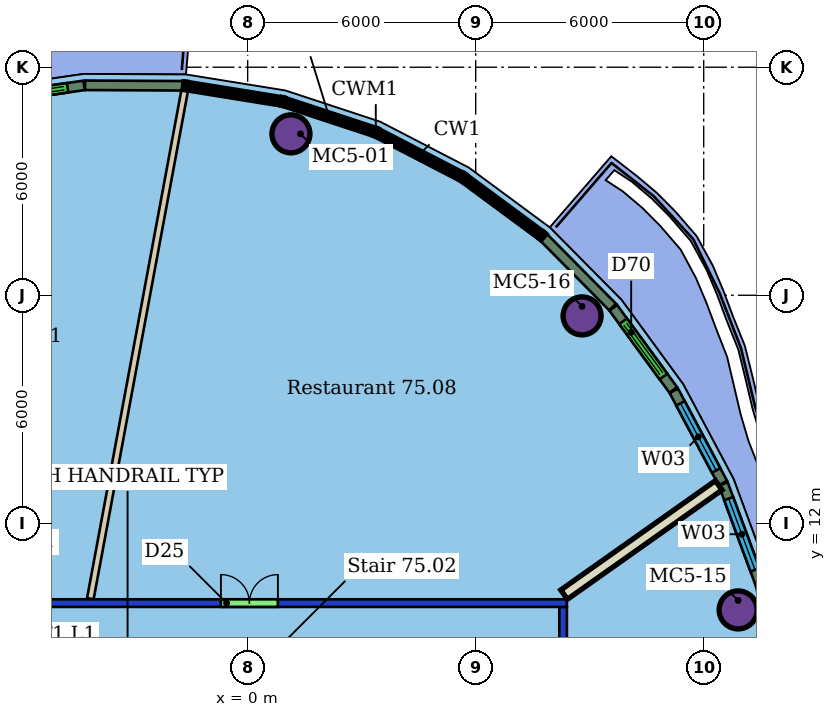
"""IFC4 building model, lengths in metres.
Left out: names, types, materials, properties, quantities, classifications, styles, units other than length and angle.
Written with IfcOpenShell. Run it as: python <this file> out.ifc"""

import sys

from ifc_helpers import new_model, si_unit, direction, frame, frame_2d, origin, origin_2d, place, context, subcontext, project, spatial, rectangle, hollow_circle, extrude, element, fill, save


model = new_model("IFC4")
c1 = context("Model", 3, precision=1e-05, world=origin(), true_north=direction((0.0, 1.0)))
c2 = subcontext(c1, "Body", "Model", "MODEL_VIEW")
j1 = project(units=[si_unit("LENGTHUNIT", "METRE"), si_unit("PLANEANGLEUNIT", "RADIAN")], contexts=[c1])
p1 = place(None, origin())
s1 = spatial("IfcSite", under=j1, at=p1, CompositionType="ELEMENT")
p2 = place(p1, origin())
s2 = spatial("IfcBuilding", under=s1, at=p2, CompositionType="ELEMENT")
p3 = place(p2, frame((0.0, 0.0, 300.9)))
s3 = spatial("IfcBuildingStorey", under=s2, at=p3, CompositionType="ELEMENT", Elevation=300.9)
for number, where, z_axis, x_axis in (
    (1, (1.138, 22.247, 0.0), (0.0, 0.0, 1.0), (1.0, 0.0, 0.0)),
    (2, (12.906, 9.72, 0.0), (0.0, 0.0, 1.0), (1.0, 0.0, 0.0)),
    (3, (8.8, 17.457, 0.0), (0.0, 0.0, 1.0), (1.0, 0.0, 0.0)),
):
    element("IfcColumn", number, at=place(p3, frame(where, z_axis=z_axis, x_axis=x_axis)), inside=s3, PredefinedType="COLUMN", context=c2, shape_type="SweptSolid", body=[
        extrude(hollow_circle(Radius=0.5, WallThickness=0.04, at=origin_2d()), origin(), (0.0, 0.0, 1.0), 3.4),
    ])
p4 = place(p3, frame((-20.4, 9.9, 0.0), z_axis=(0.0, 0.0, 1.0), x_axis=(1.0, 0.0, 0.0)))
e4 = element("IfcWall", 4, at=p4, inside=s3, PredefinedType="PARTITIONING", context=c2, shape_type="SweptSolid", body=[
    extrude(rectangle(XDim=28.8, YDim=0.2, at=frame_2d((14.4, 0.0))), origin(), (0.0, 0.0, 1.0), 3.05),
])
p5 = place(p4, frame((11.495, 0.0, 0.0)))
e5 = element("IfcOpeningElement", 5, at=p5, cuts=e4, PredefinedType="OPENING", context=c2, shape_type="SweptSolid", body=[
    extrude(rectangle(XDim=1.8, YDim=2.1, at=frame_2d((0.9, 1.05))), frame((0.0, 0.11, 0.0), z_axis=(0.0, -1.0, 0.0), x_axis=(1.0, 0.0, 0.0)), (0.0, 0.0, 1.0), 0.22),
])
p6 = place(p4, frame((5.758, 0.0, 0.0)))
e6 = element("IfcOpeningElement", 6, at=p6, cuts=e4, PredefinedType="OPENING", context=c2, shape_type="SweptSolid", body=[
    extrude(rectangle(XDim=1.5, YDim=2.1, at=frame_2d((0.75, 1.05))), frame((0.0, 0.11, 0.0), z_axis=(0.0, -1.0, 0.0), x_axis=(1.0, 0.0, 0.0)), (0.0, 0.0, 1.0), 0.22),
])
p7 = place(p4, frame((19.695, 0.0, 0.0)))
e7 = element("IfcOpeningElement", 7, at=p7, cuts=e4, PredefinedType="OPENING", context=c2, shape_type="SweptSolid", body=[
    extrude(rectangle(XDim=1.5, YDim=2.4, at=frame_2d((0.75, 1.2))), frame((0.0, 0.11, 0.0), z_axis=(0.0, -1.0, 0.0), x_axis=(1.0, 0.0, 0.0)), (0.0, 0.0, 1.0), 0.22),
])
p8 = place(p3, frame((8.3, 9.8, 0.0), z_axis=(0.0, 0.0, 1.0), x_axis=(0.0, -1.0, 0.0)))
e8 = element("IfcWall", 8, at=p8, inside=s3, PredefinedType="PARTITIONING", context=c2, shape_type="SweptSolid", body=[
    extrude(rectangle(XDim=19.6, YDim=0.2, at=frame_2d((9.8, 0.0))), origin(), (0.0, 0.0, 1.0), 3.05),
])
p9 = place(p8, frame((11.636, 0.0, 0.0)))
e9 = element("IfcOpeningElement", 9, at=p9, cuts=e8, PredefinedType="OPENING", context=c2, shape_type="SweptSolid", body=[
    extrude(rectangle(XDim=1.8, YDim=2.4, at=frame_2d((0.9, 1.2))), frame((0.0, 0.11, 0.0), z_axis=(0.0, -1.0, 0.0), x_axis=(1.0, 0.0, 0.0)), (0.0, 0.0, 1.0), 0.22),
])
p10 = place(p3, frame((-1.658, 23.387, 0.0), z_axis=(0.0, 0.0, 1.0), x_axis=(-0.1825398841, -0.983198449303, 0.0)))
e10 = element("IfcWall", 10, at=p10, inside=s3, PredefinedType="PARTITIONING", context=c2, shape_type="SweptSolid", body=[
    extrude(rectangle(XDim=13.599, YDim=0.175, at=frame_2d((6.8, 0.0))), origin(), (0.0, 0.0, 1.0), 3.4),
])
p11 = place(p3, frame((12.396, 12.998, 0.0), z_axis=(0.0, 0.0, 1.0), x_axis=(-0.816698923904, -0.577064006583, 0.0)))
e11 = element("IfcWall", 11, at=p11, inside=s3, PredefinedType="PARTITIONING", context=c2, shape_type="SweptSolid", body=[
    extrude(rectangle(XDim=4.983, YDim=0.3, at=frame_2d((2.491, 0.0))), origin(), (0.0, 0.0, 1.0), 3.4),
])
p12 = place(p3, frame((-1.703, 23.511, 0.0), z_axis=(0.0, 0.0, 1.0), x_axis=(-0.999986408608, 0.005213693476, 0.0)))
e12 = element("IfcWall", 12, at=p12, inside=s3, PredefinedType="SOLIDWALL", context=c2, shape_type="SweptSolid", body=[
    extrude(rectangle(XDim=2.575, YDim=0.25, at=frame_2d((1.288, 0.0))), origin(), (0.0, 0.0, 1.0), 3.1),
])
p13 = place(p3, frame((-4.305, 23.523, 0.0), z_axis=(0.0, 0.0, 1.0), x_axis=(-0.989681415389, -0.143285365734, 0.0)))
e13 = element("IfcWall", 13, at=p13, inside=s3, PredefinedType="SOLIDWALL", context=c2, shape_type="SweptSolid", body=[
    extrude(rectangle(XDim=2.677, YDim=0.25, at=frame_2d((1.338, 0.0))), origin(), (0.0, 0.0, 1.0), 3.1),
])
p14 = place(p13, frame((0.438, 0.0, 0.0)))
e14 = element("IfcOpeningElement", 14, at=p14, cuts=e13, PredefinedType="OPENING", context=c2, shape_type="SweptSolid", body=[
    extrude(rectangle(XDim=1.8, YDim=2.4, at=frame_2d((0.9, 1.2))), frame((0.0, 0.135, 0.0), z_axis=(0.0, -1.0, 0.0), x_axis=(1.0, 0.0, 0.0)), (0.0, 0.0, 1.0), 0.27),
])
p15 = place(p3, frame((14.147, 7.533, 0.0), z_axis=(0.0, 0.0, 1.0), x_axis=(-0.223256314802, 0.974759774458, 0.0)))
e15 = element("IfcWall", 15, at=p15, inside=s3, PredefinedType="SOLIDWALL", context=c2, shape_type="SweptSolid", body=[
    extrude(rectangle(XDim=2.903, YDim=0.25, at=frame_2d((1.452, 0.0))), origin(), (0.0, 0.0, 1.0), 3.1),
])
p16 = place(p15, frame((0.302, 0.0, 0.9)))
e16 = element("IfcOpeningElement", 16, at=p16, cuts=e15, PredefinedType="OPENING", context=c2, shape_type="SweptSolid", body=[
    extrude(rectangle(XDim=2.0, YDim=2.1, at=frame_2d((1.0, 1.05))), frame((0.0, 0.135, 0.0), z_axis=(0.0, -1.0, 0.0), x_axis=(1.0, 0.0, 0.0)), (0.0, 0.0, 1.0), 0.27),
])
p17 = place(p3, frame((13.492, 10.387, 0.0), z_axis=(0.0, 0.0, 1.0), x_axis=(-0.3462418827, 0.938145275885, 0.0)))
e17 = element("IfcWall", 17, at=p17, inside=s3, PredefinedType="SOLIDWALL", context=c2, shape_type="SweptSolid", body=[
    extrude(rectangle(XDim=2.825, YDim=0.25, at=frame_2d((1.413, 0.0))), origin(), (0.0, 0.0, 1.0), 3.1),
])
p18 = place(p17, frame((0.413, 0.0, 0.9)))
e18 = element("IfcOpeningElement", 18, at=p18, cuts=e17, PredefinedType="OPENING", context=c2, shape_type="SweptSolid", body=[
    extrude(rectangle(XDim=2.0, YDim=2.1, at=frame_2d((1.0, 1.05))), frame((0.0, 0.135, 0.0), z_axis=(0.0, -1.0, 0.0), x_axis=(1.0, 0.0, 0.0)), (0.0, 0.0, 1.0), 0.27),
])
p19 = place(p3, frame((12.504, 13.06, 0.0), z_axis=(0.0, 0.0, 1.0), x_axis=(-0.469564356189, 0.882898247476, 0.0)))
e19 = element("IfcWall", 19, at=p19, inside=s3, PredefinedType="SOLIDWALL", context=c2, shape_type="SweptSolid", body=[
    extrude(rectangle(XDim=2.748, YDim=0.25, at=frame_2d((1.374, 0.0))), origin(), (0.0, 0.0, 1.0), 3.1),
])
p20 = place(p19, frame((0.374, 0.0, 0.9)))
e20 = element("IfcOpeningElement", 20, at=p20, cuts=e19, PredefinedType="OPENING", context=c2, shape_type="SweptSolid", body=[
    extrude(rectangle(XDim=2.0, YDim=2.1, at=frame_2d((1.0, 1.05))), frame((0.0, 0.135, 0.0), z_axis=(0.0, -1.0, 0.0), x_axis=(1.0, 0.0, 0.0)), (0.0, 0.0, 1.0), 0.27),
])
p21 = place(p3, frame((11.2, 15.508, 0.0), z_axis=(0.0, 0.0, 1.0), x_axis=(-0.59003031017, 0.80738109532, 0.0)))
e21 = element("IfcWall", 21, at=p21, inside=s3, PredefinedType="SOLIDWALL", context=c2, shape_type="SweptSolid", body=[
    extrude(rectangle(XDim=2.677, YDim=0.25, at=frame_2d((1.338, 0.0))), origin(), (0.0, 0.0, 1.0), 3.1),
])
p22 = place(p21, frame((0.438, 0.0, 0.0)))
e22 = element("IfcOpeningElement", 22, at=p22, cuts=e21, PredefinedType="OPENING", context=c2, shape_type="SweptSolid", body=[
    extrude(rectangle(XDim=1.8, YDim=2.4, at=frame_2d((0.9, 1.2))), frame((0.0, 0.135, 0.0), z_axis=(0.0, -1.0, 0.0), x_axis=(1.0, 0.0, 0.0)), (0.0, 0.0, 1.0), 0.27),
])
p23 = place(p3, frame((9.603, 17.69, 0.0), z_axis=(0.0, 0.0, 1.0), x_axis=(-0.70340049818, 0.71079373883, 0.0)))
e23 = element("IfcWall", 23, at=p23, inside=s3, PredefinedType="SOLIDWALL", context=c2, shape_type="SweptSolid", body=[
    extrude(rectangle(XDim=2.576, YDim=0.25, at=frame_2d((1.288, 0.0))), origin(), (0.0, 0.0, 1.0), 3.1),
])
p24 = place(p7, origin())
e24 = element("IfcDoor", 24, at=p24, inside=s3, OperationType="DOUBLE_DOOR_SINGLE_SWING", PredefinedType="DOOR", context=c2, shape_type="SweptSolid", body=[
    extrude(rectangle(XDim=1.5, YDim=2.4, at=frame_2d((0.75, 1.2))), frame((0.0, 0.025, 0.0), z_axis=(0.0, -1.0, 0.0), x_axis=(1.0, 0.0, 0.0)), (0.0, 0.0, 1.0), 0.05),
])
fill(e7, e24)
p25 = place(p14, origin())
e25 = element("IfcDoor", 25, at=p25, inside=s3, OperationType="DOUBLE_DOOR_SLIDING", PredefinedType="DOOR", context=c2, shape_type="SweptSolid", body=[
    extrude(rectangle(XDim=1.8, YDim=2.4, at=frame_2d((0.9, 1.2))), frame((0.0, 0.025, 0.0), z_axis=(0.0, -1.0, 0.0), x_axis=(1.0, 0.0, 0.0)), (0.0, 0.0, 1.0), 0.05),
])
fill(e14, e25)
p26 = place(p18, origin())
e26 = element("IfcWindow", 26, at=p26, inside=s3, PartitioningType="SINGLE_PANEL", PredefinedType="WINDOW", context=c2, shape_type="SweptSolid", body=[
    extrude(rectangle(XDim=2.0, YDim=2.1, at=frame_2d((1.0, 1.05))), frame((0.0, 0.03, 0.0), z_axis=(0.0, -1.0, 0.0), x_axis=(1.0, 0.0, 0.0)), (0.0, 0.0, 1.0), 0.06),
])
fill(e18, e26)
p27 = place(p20, origin())
e27 = element("IfcWindow", 27, at=p27, inside=s3, PartitioningType="SINGLE_PANEL", PredefinedType="WINDOW", context=c2, shape_type="SweptSolid", body=[
    extrude(rectangle(XDim=2.0, YDim=2.1, at=frame_2d((1.0, 1.05))), frame((0.0, 0.03, 0.0), z_axis=(0.0, -1.0, 0.0), x_axis=(1.0, 0.0, 0.0)), (0.0, 0.0, 1.0), 0.06),
])
fill(e20, e27)
p28 = place(p22, origin())
e28 = element("IfcDoor", 28, at=p28, inside=s3, OperationType="DOUBLE_DOOR_SLIDING", PredefinedType="DOOR", context=c2, shape_type="SweptSolid", body=[
    extrude(rectangle(XDim=1.8, YDim=2.4, at=frame_2d((0.9, 1.2))), frame((0.0, 0.025, 0.0), z_axis=(0.0, -1.0, 0.0), x_axis=(1.0, 0.0, 0.0)), (0.0, 0.0, 1.0), 0.05),
])
fill(e22, e28)
save(model, sys.argv[1])
